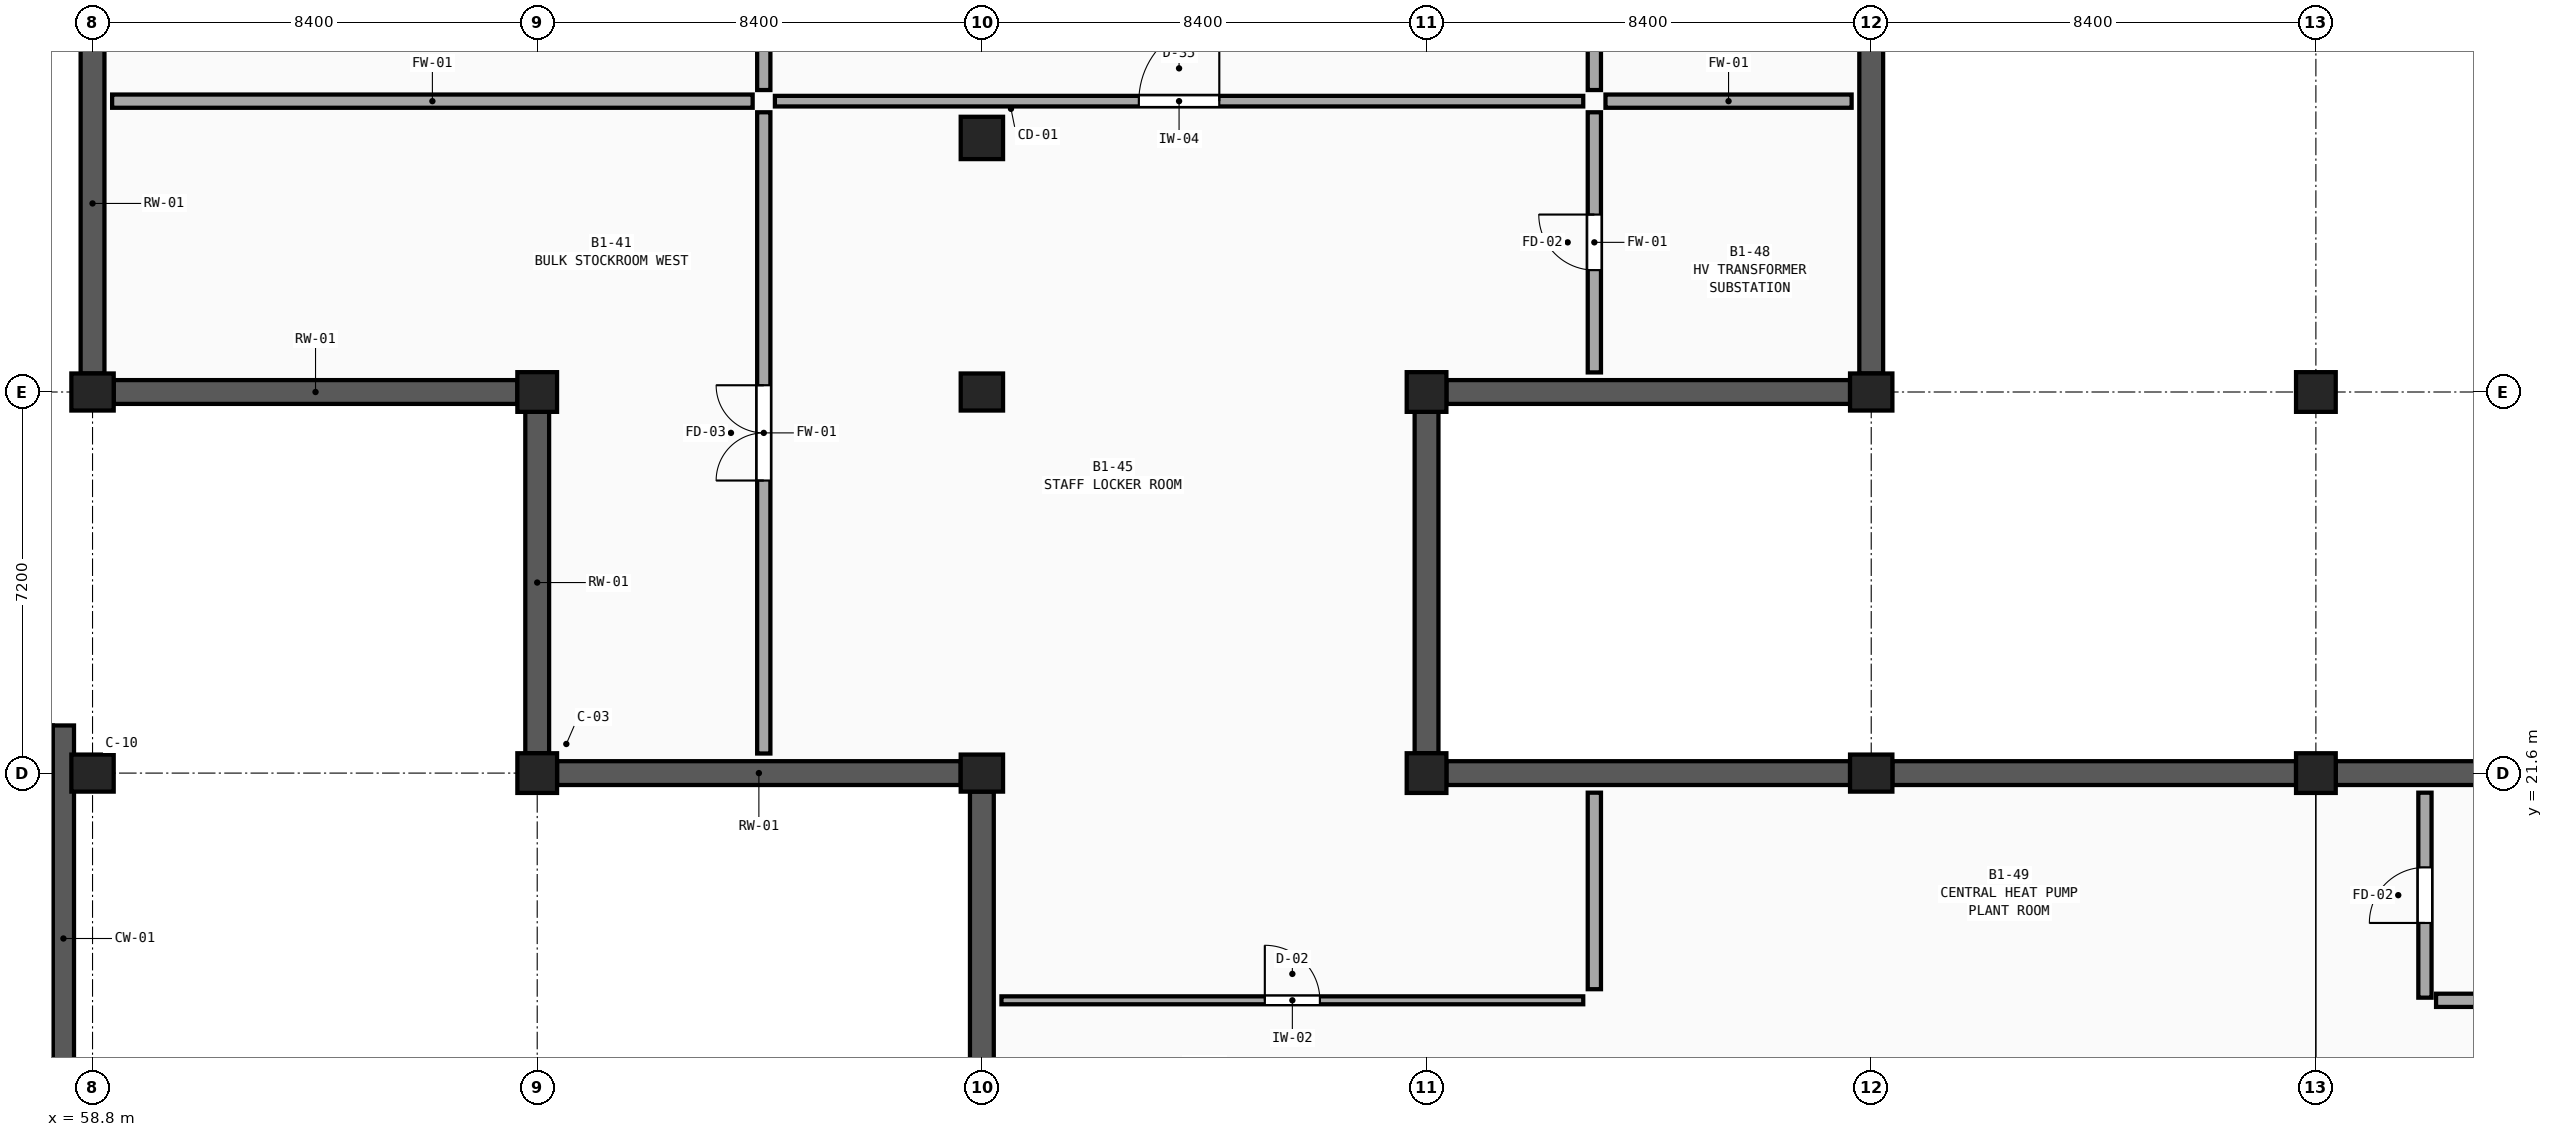
"""IFC4 building model, lengths in metres.
Left out: names, types, materials, properties, quantities, classifications, styles, units other than length and angle.
Written with IfcOpenShell. Run it as: python <this file> out.ifc"""

import sys

from ifc_helpers import new_model, si_unit, direction, frame, frame_2d, origin, origin_2d, place, context, subcontext, project, spatial, rectangle, circle, extrude, element, fill, save


model = new_model("IFC4")
c1 = context("Model", 3, precision=1e-05, world=origin(), true_north=direction((0.0, 1.0)))
c2 = subcontext(c1, "Body", "Model", "MODEL_VIEW")
j1 = project(units=[si_unit("LENGTHUNIT", "METRE"), si_unit("PLANEANGLEUNIT", "RADIAN")], contexts=[c1])
p1 = place(None, origin())
s1 = spatial("IfcSite", under=j1, at=p1, CompositionType="ELEMENT")
p2 = place(p1, origin())
s2 = spatial("IfcBuilding", under=s1, at=p2, CompositionType="ELEMENT")
p3 = place(p2, frame((0.0, 0.0, -5.4)))
s3 = spatial("IfcBuildingStorey", under=s2, at=p3, CompositionType="ELEMENT", Elevation=-5.4)
for number, where, z_axis, x_axis in (
    (1, (58.8, 21.6, 0.0), (0.0, 0.0, 1.0), (1.0, 0.0, 0.0)),
    (2, (58.8, 28.8, 0.0), (0.0, 0.0, 1.0), (1.0, 0.0, 0.0)),
):
    element("IfcColumn", number, at=place(p3, frame(where, z_axis=z_axis, x_axis=x_axis)), inside=s3, PredefinedType="COLUMN", context=c2, shape_type="SweptSolid", body=[
        extrude(rectangle(XDim=0.8, YDim=0.7, at=origin_2d()), origin(), (0.0, 0.0, 1.0), 5.4),
    ])
for number, where, z_axis, x_axis in (
    (3, (67.2, 21.6, 0.0), (0.0, 0.0, 1.0), (1.0, 0.0, 0.0)),
    (4, (67.2, 28.8, 0.0), (0.0, 0.0, 1.0), (1.0, 0.0, 0.0)),
):
    element("IfcColumn", number, at=place(p3, frame(where, z_axis=z_axis, x_axis=x_axis)), inside=s3, PredefinedType="COLUMN", context=c2, shape_type="SweptSolid", body=[
        extrude(rectangle(XDim=0.75, YDim=0.75, at=origin_2d()), origin(), (0.0, 0.0, 1.0), 5.4),
    ])
for number, where, z_axis, x_axis in (
    (5, (75.6, 21.6, 0.0), (0.0, 0.0, 1.0), (1.0, 0.0, 0.0)),
    (6, (75.6, 28.8, 0.0), (0.0, 0.0, 1.0), (1.0, 0.0, 0.0)),
):
    element("IfcColumn", number, at=place(p3, frame(where, z_axis=z_axis, x_axis=x_axis)), inside=s3, PredefinedType="COLUMN", context=c2, shape_type="SweptSolid", body=[
        extrude(rectangle(XDim=0.8, YDim=0.7, at=origin_2d()), origin(), (0.0, 0.0, 1.0), 5.4),
    ])
for number, where, z_axis, x_axis in (
    (7, (84.0, 21.6, 0.0), (0.0, 0.0, 1.0), (1.0, 0.0, 0.0)),
    (8, (84.0, 28.8, 0.0), (0.0, 0.0, 1.0), (1.0, 0.0, 0.0)),
):
    element("IfcColumn", number, at=place(p3, frame(where, z_axis=z_axis, x_axis=x_axis)), inside=s3, PredefinedType="COLUMN", context=c2, shape_type="SweptSolid", body=[
        extrude(rectangle(XDim=0.75, YDim=0.75, at=origin_2d()), origin(), (0.0, 0.0, 1.0), 5.4),
    ])
for number, where, z_axis, x_axis in (
    (9, (92.4, 21.6, 0.0), (0.0, 0.0, 1.0), (1.0, 0.0, 0.0)),
    (10, (92.4, 28.8, 0.0), (0.0, 0.0, 1.0), (1.0, 0.0, 0.0)),
):
    element("IfcColumn", number, at=place(p3, frame(where, z_axis=z_axis, x_axis=x_axis)), inside=s3, PredefinedType="COLUMN", context=c2, shape_type="SweptSolid", body=[
        extrude(rectangle(XDim=0.8, YDim=0.7, at=origin_2d()), origin(), (0.0, 0.0, 1.0), 5.4),
    ])
for number, where, z_axis, x_axis in (
    (11, (100.8, 21.6, 0.0), (0.0, 0.0, 1.0), (1.0, 0.0, 0.0)),
    (12, (100.8, 28.8, 0.0), (0.0, 0.0, 1.0), (1.0, 0.0, 0.0)),
):
    element("IfcColumn", number, at=place(p3, frame(where, z_axis=z_axis, x_axis=x_axis)), inside=s3, PredefinedType="COLUMN", context=c2, shape_type="SweptSolid", body=[
        extrude(rectangle(XDim=0.75, YDim=0.75, at=origin_2d()), origin(), (0.0, 0.0, 1.0), 5.4),
    ])
p4 = place(p3, frame((75.6, 33.6, 0.0), z_axis=(0.0, 0.0, 1.0), x_axis=(1.0, 0.0, 0.0)))
e13 = element("IfcColumn", 13, at=p4, inside=s3, PredefinedType="COLUMN", context=c2, shape_type="SweptSolid", body=[
    extrude(circle(Radius=0.4, at=origin_2d()), origin(), (0.0, 0.0, 1.0), 5.4),
])
p5 = place(p3, frame((66.825, 28.8, 0.0), z_axis=(0.0, 0.0, 1.0), x_axis=(-1.0, 0.0, 0.0)))
e14 = element("IfcWall", 14, at=p5, inside=s3, PredefinedType="USERDEFINED", context=c2, shape_type="SweptSolid", body=[
    extrude(rectangle(XDim=7.625, YDim=0.45, at=frame_2d((3.812, 0.0))), origin(), (0.0, 0.0, 1.0), 4.5),
])
p6 = place(p3, frame((58.8, 29.15, 0.0), z_axis=(0.0, 0.0, 1.0), x_axis=(0.0, 1.0, 0.0)))
e15 = element("IfcWall", 15, at=p6, inside=s3, PredefinedType="USERDEFINED", context=c2, shape_type="SweptSolid", body=[
    extrude(rectangle(XDim=6.425, YDim=0.45, at=frame_2d((3.212, 0.0))), origin(), (0.0, 0.0, 1.0), 4.5),
])
p7 = place(p3, frame((75.2, 21.6, 0.0), z_axis=(0.0, 0.0, 1.0), x_axis=(-1.0, 0.0, 0.0)))
e16 = element("IfcWall", 16, at=p7, inside=s3, PredefinedType="USERDEFINED", context=c2, shape_type="SweptSolid", body=[
    extrude(rectangle(XDim=7.625, YDim=0.45, at=frame_2d((3.812, 0.0))), origin(), (0.0, 0.0, 1.0), 4.5),
])
p8 = place(p3, frame((67.2, 21.975, 0.0), z_axis=(0.0, 0.0, 1.0), x_axis=(0.0, 1.0, 0.0)))
e17 = element("IfcWall", 17, at=p8, inside=s3, PredefinedType="USERDEFINED", context=c2, shape_type="SweptSolid", body=[
    extrude(rectangle(XDim=6.45, YDim=0.45, at=frame_2d((3.225, 0.0))), origin(), (0.0, 0.0, 1.0), 4.5),
])
p9 = place(p3, frame((75.6, 14.75, 0.0), z_axis=(0.0, 0.0, 1.0), x_axis=(0.0, 1.0, 0.0)))
e18 = element("IfcWall", 18, at=p9, inside=s3, PredefinedType="USERDEFINED", context=c2, shape_type="SweptSolid", body=[
    extrude(rectangle(XDim=6.5, YDim=0.45, at=frame_2d((3.25, 0.0))), origin(), (0.0, 0.0, 1.0), 4.5),
])
p10 = place(p3, frame((84.0, 28.425, 0.0), z_axis=(0.0, 0.0, 1.0), x_axis=(0.0, -1.0, 0.0)))
e19 = element("IfcWall", 19, at=p10, inside=s3, PredefinedType="USERDEFINED", context=c2, shape_type="SweptSolid", body=[
    extrude(rectangle(XDim=6.45, YDim=0.45, at=frame_2d((3.225, 0.0))), origin(), (0.0, 0.0, 1.0), 4.5),
])
for number, where, z_axis, x_axis in (
    (20, (84.375, 21.6, 0.0), (0.0, 0.0, 1.0), (1.0, 0.0, 0.0)),
    (21, (92.0, 28.8, 0.0), (0.0, 0.0, 1.0), (-1.0, 0.0, 0.0)),
):
    element("IfcWall", number, at=place(p3, frame(where, z_axis=z_axis, x_axis=x_axis)), inside=s3, PredefinedType="USERDEFINED", context=c2, shape_type="SweptSolid", body=[
        extrude(rectangle(XDim=7.625, YDim=0.45, at=frame_2d((3.812, 0.0))), origin(), (0.0, 0.0, 1.0), 4.5),
    ])
p11 = place(p3, frame((92.4, 35.65, 0.0), z_axis=(0.0, 0.0, 1.0), x_axis=(0.0, -1.0, 0.0)))
e22 = element("IfcWall", 22, at=p11, inside=s3, PredefinedType="USERDEFINED", context=c2, shape_type="SweptSolid", body=[
    extrude(rectangle(XDim=6.5, YDim=0.45, at=frame_2d((3.25, 0.0))), origin(), (0.0, 0.0, 1.0), 4.5),
])
for number, where, z_axis, x_axis in (
    (23, (92.8, 21.6, 0.0), (0.0, 0.0, 1.0), (1.0, 0.0, 0.0)),
    (24, (101.175, 21.6, 0.0), (0.0, 0.0, 1.0), (1.0, 0.0, 0.0)),
):
    element("IfcWall", number, at=place(p3, frame(where, z_axis=z_axis, x_axis=x_axis)), inside=s3, PredefinedType="USERDEFINED", context=c2, shape_type="SweptSolid", body=[
        extrude(rectangle(XDim=7.625, YDim=0.45, at=frame_2d((3.812, 0.0))), origin(), (0.0, 0.0, 1.0), 4.5),
    ])
p12 = place(p3, frame((51.15, 22.3, 0.0), z_axis=(0.0, 0.0, 1.0), x_axis=(1.0, 0.0, 0.0)))
e25 = element("IfcWall", 25, at=p12, inside=s3, PredefinedType="SHEAR", context=c2, shape_type="SweptSolid", body=[
    extrude(rectangle(XDim=6.9, YDim=0.4, at=frame_2d((3.45, 0.0))), origin(), (0.0, 0.0, 1.0), 5.4),
])
p13 = place(p3, frame((58.25, 14.45, 0.0), z_axis=(0.0, 0.0, 1.0), x_axis=(0.0, 1.0, 0.0)))
e26 = element("IfcWall", 26, at=p13, inside=s3, PredefinedType="SHEAR", context=c2, shape_type="SweptSolid", body=[
    extrude(rectangle(XDim=8.05, YDim=0.4, at=frame_2d((4.025, 0.0))), origin(), (0.0, 0.0, 1.0), 5.4),
])
p14 = place(p3, frame((71.48, 34.505, 0.0), z_axis=(0.0, 0.0, 1.0), x_axis=(0.0, 1.0, 0.0)))
e27 = element("IfcWall", 27, at=p14, inside=s3, PredefinedType="SOLIDWALL", context=c2, shape_type="SweptSolid", body=[
    extrude(rectangle(XDim=17.515, YDim=0.25, at=frame_2d((8.758, 0.0))), origin(), (0.0, 0.0, 1.0), 5.05),
])
p15 = place(p14, frame((7.857, 0.0, 0.0)))
e28 = element("IfcOpeningElement", 28, at=p15, cuts=e27, PredefinedType="OPENING", context=c2, shape_type="SweptSolid", body=[
    extrude(rectangle(XDim=1.8, YDim=2.3, at=frame_2d((0.9, 1.15))), frame((0.0, 0.145, 0.0), z_axis=(0.0, -1.0, 0.0), x_axis=(1.0, 0.0, 0.0)), (0.0, 0.0, 1.0), 0.29),
])
p16 = place(p3, frame((87.17, 34.505, 0.0), z_axis=(0.0, 0.0, 1.0), x_axis=(0.0, 1.0, 0.0)))
e29 = element("IfcWall", 29, at=p16, inside=s3, PredefinedType="SOLIDWALL", context=c2, shape_type="SweptSolid", body=[
    extrude(rectangle(XDim=17.515, YDim=0.25, at=frame_2d((8.758, 0.0))), origin(), (0.0, 0.0, 1.0), 5.05),
])
p17 = place(p3, frame((103.07, 17.307, 0.0), z_axis=(0.0, 0.0, 1.0), x_axis=(1.0, 0.0, 0.0)))
e30 = element("IfcWall", 30, at=p17, inside=s3, PredefinedType="SOLIDWALL", context=c2, shape_type="SweptSolid", body=[
    extrude(rectangle(XDim=16.15, YDim=0.25, at=frame_2d((8.075, 0.0))), origin(), (0.0, 0.0, 1.0), 5.05),
])
p18 = place(p17, frame((7.175, 0.0, 0.0)))
e31 = element("IfcOpeningElement", 31, at=p18, cuts=e30, PredefinedType="OPENING", context=c2, shape_type="SweptSolid", body=[
    extrude(rectangle(XDim=1.8, YDim=2.3, at=frame_2d((0.9, 1.15))), frame((0.0, 0.145, 0.0), z_axis=(0.0, -1.0, 0.0), x_axis=(1.0, 0.0, 0.0)), (0.0, 0.0, 1.0), 0.29),
])
p19 = place(p3, frame((71.69, 34.295, 0.0), z_axis=(0.0, 0.0, 1.0), x_axis=(1.0, 0.0, 0.0)))
e32 = element("IfcWall", 32, at=p19, inside=s3, PredefinedType="PLUMBINGWALL", context=c2, shape_type="SweptSolid", body=[
    extrude(rectangle(XDim=15.27, YDim=0.2, at=frame_2d((7.635, 0.0))), origin(), (0.0, 0.0, 1.0), 4.45),
])
p20 = place(p19, frame((6.875, 0.0, 0.0)))
e33 = element("IfcOpeningElement", 33, at=p20, cuts=e32, PredefinedType="OPENING", context=c2, shape_type="SweptSolid", body=[
    extrude(rectangle(XDim=1.52, YDim=2.45, at=frame_2d((0.76, 1.225))), frame((0.0, 0.12, 0.0), z_axis=(0.0, -1.0, 0.0), x_axis=(1.0, 0.0, 0.0)), (0.0, 0.0, 1.0), 0.24),
])
p21 = place(p3, frame((71.48, 21.97, 0.0), z_axis=(0.0, 0.0, 1.0), x_axis=(0.0, 1.0, 0.0)))
e34 = element("IfcWall", 34, at=p21, inside=s3, PredefinedType="SOLIDWALL", context=c2, shape_type="SweptSolid", body=[
    extrude(rectangle(XDim=12.115, YDim=0.25, at=frame_2d((6.058, 0.0))), origin(), (0.0, 0.0, 1.0), 5.05),
])
p22 = place(p21, frame((5.157, 0.0, 0.0)))
e35 = element("IfcOpeningElement", 35, at=p22, cuts=e34, PredefinedType="OPENING", context=c2, shape_type="SweptSolid", body=[
    extrude(rectangle(XDim=1.8, YDim=2.3, at=frame_2d((0.9, 1.15))), frame((0.0, 0.145, 0.0), z_axis=(0.0, -1.0, 0.0), x_axis=(1.0, 0.0, 0.0)), (0.0, 0.0, 1.0), 0.29),
])
p23 = place(p3, frame((59.17, 34.295, 0.0), z_axis=(0.0, 0.0, 1.0), x_axis=(1.0, 0.0, 0.0)))
e36 = element("IfcWall", 36, at=p23, inside=s3, PredefinedType="SOLIDWALL", context=c2, shape_type="SweptSolid", body=[
    extrude(rectangle(XDim=12.1, YDim=0.25, at=frame_2d((6.05, 0.0))), origin(), (0.0, 0.0, 1.0), 4.45),
])
p24 = place(p3, frame((75.97, 17.307, 0.0), z_axis=(0.0, 0.0, 1.0), x_axis=(1.0, 0.0, 0.0)))
e37 = element("IfcWall", 37, at=p24, inside=s3, PredefinedType="PARTITIONING", context=c2, shape_type="SweptSolid", body=[
    extrude(rectangle(XDim=10.99, YDim=0.15, at=frame_2d((5.495, 0.0))), origin(), (0.0, 0.0, 1.0), 5.05),
])
p25 = place(p24, frame((4.975, 0.0, 0.0)))
e38 = element("IfcOpeningElement", 38, at=p25, cuts=e37, PredefinedType="OPENING", context=c2, shape_type="SweptSolid", body=[
    extrude(rectangle(XDim=1.04, YDim=2.05, at=frame_2d((0.52, 1.025))), frame((0.0, 0.095, 0.0), z_axis=(0.0, -1.0, 0.0), x_axis=(1.0, 0.0, 0.0)), (0.0, 0.0, 1.0), 0.19),
])
p26 = place(p3, frame((87.17, 29.17, 0.0), z_axis=(0.0, 0.0, 1.0), x_axis=(0.0, 1.0, 0.0)))
e39 = element("IfcWall", 39, at=p26, inside=s3, PredefinedType="SOLIDWALL", context=c2, shape_type="SweptSolid", body=[
    extrude(rectangle(XDim=4.915, YDim=0.25, at=frame_2d((2.458, 0.0))), origin(), (0.0, 0.0, 1.0), 5.05),
])
p27 = place(p26, frame((1.933, 0.0, 0.0)))
e40 = element("IfcOpeningElement", 40, at=p27, cuts=e39, PredefinedType="OPENING", context=c2, shape_type="SweptSolid", body=[
    extrude(rectangle(XDim=1.05, YDim=2.15, at=frame_2d((0.525, 1.075))), frame((0.0, 0.145, 0.0), z_axis=(0.0, -1.0, 0.0), x_axis=(1.0, 0.0, 0.0)), (0.0, 0.0, 1.0), 0.29),
])
p28 = place(p3, frame((87.38, 34.295, 0.0), z_axis=(0.0, 0.0, 1.0), x_axis=(1.0, 0.0, 0.0)))
e41 = element("IfcWall", 41, at=p28, inside=s3, PredefinedType="SOLIDWALL", context=c2, shape_type="SweptSolid", body=[
    extrude(rectangle(XDim=4.65, YDim=0.25, at=frame_2d((2.325, 0.0))), origin(), (0.0, 0.0, 1.0), 5.05),
])
p29 = place(p3, frame((102.86, 17.357, 0.0), z_axis=(0.0, 0.0, 1.0), x_axis=(0.0, 1.0, 0.0)))
e42 = element("IfcWall", 42, at=p29, inside=s3, PredefinedType="SOLIDWALL", context=c2, shape_type="SweptSolid", body=[
    extrude(rectangle(XDim=3.873, YDim=0.25, at=frame_2d((1.937, 0.0))), origin(), (0.0, 0.0, 1.0), 5.05),
])
p30 = place(p29, frame((1.412, 0.0, 0.0)))
e43 = element("IfcOpeningElement", 43, at=p30, cuts=e42, PredefinedType="OPENING", context=c2, shape_type="SweptSolid", body=[
    extrude(rectangle(XDim=1.05, YDim=2.15, at=frame_2d((0.525, 1.075))), frame((0.0, 0.145, 0.0), z_axis=(0.0, -1.0, 0.0), x_axis=(1.0, 0.0, 0.0)), (0.0, 0.0, 1.0), 0.29),
])
p31 = place(p3, frame((87.17, 17.517, 0.0), z_axis=(0.0, 0.0, 1.0), x_axis=(0.0, 1.0, 0.0)))
e44 = element("IfcWall", 44, at=p31, inside=s3, PredefinedType="SOLIDWALL", context=c2, shape_type="SweptSolid", body=[
    extrude(rectangle(XDim=3.713, YDim=0.25, at=frame_2d((1.856, 0.0))), origin(), (0.0, 0.0, 1.0), 5.05),
])
p32 = place(p20, origin())
e45 = element("IfcDoor", 45, at=p32, inside=s3, OperationType="SINGLE_SWING_RIGHT", PredefinedType="DOOR", context=c2, shape_type="SweptSolid", body=[
    extrude(rectangle(XDim=1.52, YDim=2.45, at=frame_2d((0.76, 1.225))), frame((0.0, 0.025, 0.0), z_axis=(0.0, -1.0, 0.0), x_axis=(1.0, 0.0, 0.0)), (0.0, 0.0, 1.0), 0.05),
])
fill(e33, e45)
p33 = place(p22, origin())
e46 = element("IfcDoor", 46, at=p33, inside=s3, OperationType="DOUBLE_DOOR_SINGLE_SWING", PredefinedType="DOOR", context=c2, shape_type="SweptSolid", body=[
    extrude(rectangle(XDim=1.8, YDim=2.3, at=frame_2d((0.9, 1.15))), frame((0.0, 0.025, 0.0), z_axis=(0.0, -1.0, 0.0), x_axis=(1.0, 0.0, 0.0)), (0.0, 0.0, 1.0), 0.05),
])
fill(e35, e46)
p34 = place(p25, origin())
e47 = element("IfcDoor", 47, at=p34, inside=s3, OperationType="SINGLE_SWING_LEFT", PredefinedType="DOOR", context=c2, shape_type="SweptSolid", body=[
    extrude(rectangle(XDim=1.04, YDim=2.05, at=frame_2d((0.52, 1.025))), frame((0.0, 0.025, 0.0), z_axis=(0.0, -1.0, 0.0), x_axis=(1.0, 0.0, 0.0)), (0.0, 0.0, 1.0), 0.05),
])
fill(e38, e47)
p35 = place(p27, origin())
e48 = element("IfcDoor", 48, at=p35, inside=s3, OperationType="SINGLE_SWING_RIGHT", PredefinedType="DOOR", context=c2, shape_type="SweptSolid", body=[
    extrude(rectangle(XDim=1.05, YDim=2.15, at=frame_2d((0.525, 1.075))), frame((0.0, 0.025, 0.0), z_axis=(0.0, -1.0, 0.0), x_axis=(1.0, 0.0, 0.0)), (0.0, 0.0, 1.0), 0.05),
])
fill(e40, e48)
p36 = place(p30, origin())
e49 = element("IfcDoor", 49, at=p36, inside=s3, OperationType="SINGLE_SWING_LEFT", PredefinedType="DOOR", context=c2, shape_type="SweptSolid", body=[
    extrude(rectangle(XDim=1.05, YDim=2.15, at=frame_2d((0.525, 1.075))), frame((0.0, 0.025, 0.0), z_axis=(0.0, -1.0, 0.0), x_axis=(1.0, 0.0, 0.0)), (0.0, 0.0, 1.0), 0.05),
])
fill(e43, e49)
save(model, sys.argv[1])
